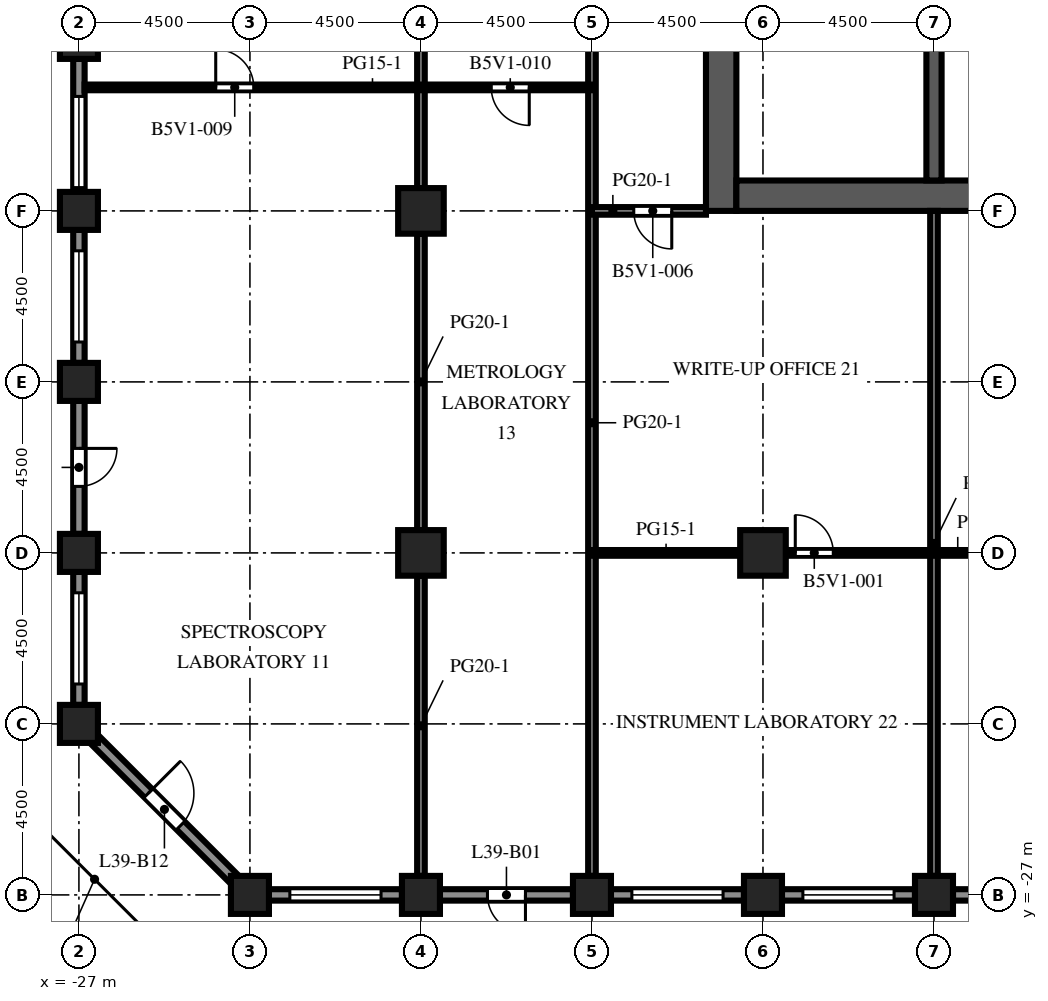
"""IFC4 building model, lengths in metres.
Left out: names, types, materials, properties, quantities, classifications, styles, units other than length and angle.
Written with IfcOpenShell. Run it as: python <this file> out.ifc"""

import sys

from ifc_helpers import new_model, si_unit, direction, frame, frame_2d, origin, origin_2d, place, context, subcontext, project, spatial, rectangle, extrude, element, fill, save


model = new_model("IFC4")
c1 = context("Model", 3, precision=1e-05, world=origin(), true_north=direction((0.0, 1.0)))
c2 = subcontext(c1, "Body", "Model", "MODEL_VIEW")
j1 = project(units=[si_unit("LENGTHUNIT", "METRE"), si_unit("PLANEANGLEUNIT", "RADIAN")], contexts=[c1])
p1 = place(None, origin())
s1 = spatial("IfcSite", under=j1, at=p1, CompositionType="ELEMENT")
p2 = place(p1, origin())
s2 = spatial("IfcBuilding", under=s1, at=p2, CompositionType="ELEMENT")
p3 = place(p2, frame((0.0, 0.0, 173.2)))
s3 = spatial("IfcBuildingStorey", under=s2, at=p3, CompositionType="ELEMENT", Elevation=173.2)
for number, where, z_axis, x_axis in (
    (1, (-27.0, -22.5, 0.0), (0.0, 0.0, 1.0), (1.0, 0.0, 0.0)),
    (2, (-27.0, -18.0, 0.0), (0.0, 0.0, 1.0), (1.0, 0.0, 0.0)),
    (3, (-27.0, -13.5, 0.0), (0.0, 0.0, 1.0), (1.0, 0.0, 0.0)),
    (4, (-27.0, -9.0, 0.0), (0.0, 0.0, 1.0), (1.0, 0.0, 0.0)),
    (5, (-27.0, -4.5, 0.0), (0.0, 0.0, 1.0), (1.0, 0.0, 0.0)),
    (6, (-22.5, -27.0, 0.0), (0.0, 0.0, 1.0), (1.0, 0.0, 0.0)),
    (7, (-18.0, -27.0, 0.0), (0.0, 0.0, 1.0), (1.0, 0.0, 0.0)),
    (8, (-13.5, -27.0, 0.0), (0.0, 0.0, 1.0), (1.0, 0.0, 0.0)),
    (9, (-9.0, -27.0, 0.0), (0.0, 0.0, 1.0), (1.0, 0.0, 0.0)),
    (10, (-4.5, -27.0, 0.0), (0.0, 0.0, 1.0), (1.0, 0.0, 0.0)),
):
    element("IfcColumn", number, at=place(p3, frame(where, z_axis=z_axis, x_axis=x_axis)), inside=s3, PredefinedType="COLUMN", context=c2, shape_type="SweptSolid", body=[
        extrude(rectangle(XDim=1.0, YDim=1.0, at=origin_2d()), origin(), (0.0, 0.0, 1.0), 4.1),
    ])
for number, where, z_axis, x_axis in (
    (11, (-18.0, -18.0, 0.0), (0.0, 0.0, 1.0), (1.0, 0.0, 0.0)),
    (12, (-18.0, -9.0, 0.0), (0.0, 0.0, 1.0), (1.0, 0.0, 0.0)),
    (13, (-9.0, -18.0, 0.0), (0.0, 0.0, 1.0), (1.0, 0.0, 0.0)),
):
    element("IfcColumn", number, at=place(p3, frame(where, z_axis=z_axis, x_axis=x_axis)), inside=s3, PredefinedType="COLUMN", context=c2, shape_type="SweptSolid", body=[
        extrude(rectangle(XDim=1.2, YDim=1.2, at=origin_2d()), origin(), (0.0, 0.0, 1.0), 4.1),
    ])
p4 = place(p3, frame((-10.1, -9.0, 0.0), z_axis=(0.0, 0.0, 1.0), x_axis=(0.0, 1.0, 0.0)))
e14 = element("IfcWall", 14, at=p4, inside=s3, PredefinedType="SHEAR", context=c2, shape_type="SweptSolid", body=[
    extrude(rectangle(XDim=27.5, YDim=0.8, at=frame_2d((13.75, 0.0))), origin(), (0.0, 0.0, 1.0), 4.1),
])
p5 = place(p4, frame((12.55, 0.0, 0.0)))
e15 = element("IfcOpeningElement", 15, at=p5, cuts=e14, PredefinedType="OPENING", context=c2, shape_type="SweptSolid", body=[
    extrude(rectangle(XDim=2.4, YDim=2.4, at=frame_2d((1.2, 1.2))), frame((0.0, 0.41, 0.0), z_axis=(0.0, -1.0, 0.0), x_axis=(1.0, 0.0, 0.0)), (0.0, 0.0, 1.0), 0.82),
])
p6 = place(p4, frame((6.825, 0.0, 0.0)))
e16 = element("IfcOpeningElement", 16, at=p6, cuts=e14, PredefinedType="OPENING", context=c2, shape_type="SweptSolid", body=[
    extrude(rectangle(XDim=1.2, YDim=2.1, at=frame_2d((0.6, 1.05))), frame((0.0, 0.41, 0.0), z_axis=(0.0, -1.0, 0.0), x_axis=(1.0, 0.0, 0.0)), (0.0, 0.0, 1.0), 0.82),
])
p7 = place(p4, frame((19.475, 0.0, 0.0)))
e17 = element("IfcOpeningElement", 17, at=p7, cuts=e14, PredefinedType="OPENING", context=c2, shape_type="SweptSolid", body=[
    extrude(rectangle(XDim=1.2, YDim=2.1, at=frame_2d((0.6, 1.05))), frame((0.0, 0.41, 0.0), z_axis=(0.0, -1.0, 0.0), x_axis=(1.0, 0.0, 0.0)), (0.0, 0.0, 1.0), 0.82),
])
p8 = place(p3, frame((-9.7, -8.6, 0.0), z_axis=(0.0, 0.0, 1.0), x_axis=(1.0, 0.0, 0.0)))
e18 = element("IfcWall", 18, at=p8, inside=s3, PredefinedType="SHEAR", context=c2, shape_type="SweptSolid", body=[
    extrude(rectangle(XDim=10.4, YDim=0.8, at=frame_2d((5.2, 0.0))), origin(), (0.0, 0.0, 1.0), 4.1),
])
p9 = place(p3, frame((-4.5, -8.2, 0.0), z_axis=(0.0, 0.0, 1.0), x_axis=(0.0, 1.0, 0.0)))
e19 = element("IfcWall", 19, at=p9, inside=s3, PredefinedType="SHEAR", context=c2, shape_type="SweptSolid", body=[
    extrude(rectangle(XDim=7.5, YDim=0.4, at=frame_2d((3.75, 0.0))), origin(), (0.0, 0.0, 1.0), 4.1),
])
p10 = place(p3, frame((-18.5, -27.0, 0.0), z_axis=(0.0, 0.0, 1.0), x_axis=(-1.0, 0.0, 0.0)))
e20 = element("IfcWall", 20, at=p10, inside=s3, PredefinedType="SOLIDWALL", context=c2, shape_type="SweptSolid", body=[
    extrude(rectangle(XDim=3.5, YDim=0.3, at=frame_2d((1.75, 0.0))), origin(), (0.0, 0.0, 1.0), 2.85),
])
p11 = place(p10, frame((0.55, 0.0, 0.8)))
e21 = element("IfcOpeningElement", 21, at=p11, cuts=e20, PredefinedType="OPENING", context=c2, shape_type="SweptSolid", body=[
    extrude(rectangle(XDim=2.4, YDim=1.7, at=frame_2d((1.2, 0.85))), frame((0.0, 0.16, 0.0), z_axis=(0.0, -1.0, 0.0), x_axis=(1.0, 0.0, 0.0)), (0.0, 0.0, 1.0), 0.32),
])
p12 = place(p3, frame((-14.0, -27.0, 0.0), z_axis=(0.0, 0.0, 1.0), x_axis=(-1.0, 0.0, 0.0)))
e22 = element("IfcWall", 22, at=p12, inside=s3, PredefinedType="SOLIDWALL", context=c2, shape_type="SweptSolid", body=[
    extrude(rectangle(XDim=3.5, YDim=0.3, at=frame_2d((1.75, 0.0))), origin(), (0.0, 0.0, 1.0), 2.85),
])
p13 = place(p12, frame((1.25, 0.0, 0.0)))
e23 = element("IfcOpeningElement", 23, at=p13, cuts=e22, PredefinedType="OPENING", context=c2, shape_type="SweptSolid", body=[
    extrude(rectangle(XDim=1.0, YDim=2.2, at=frame_2d((0.5, 1.1))), frame((0.0, 0.16, 0.0), z_axis=(0.0, -1.0, 0.0), x_axis=(1.0, 0.0, 0.0)), (0.0, 0.0, 1.0), 0.32),
])
p14 = place(p3, frame((-9.5, -27.0, 0.0), z_axis=(0.0, 0.0, 1.0), x_axis=(-1.0, 0.0, 0.0)))
e24 = element("IfcWall", 24, at=p14, inside=s3, PredefinedType="SOLIDWALL", context=c2, shape_type="SweptSolid", body=[
    extrude(rectangle(XDim=3.5, YDim=0.3, at=frame_2d((1.75, 0.0))), origin(), (0.0, 0.0, 1.0), 2.85),
])
p15 = place(p14, frame((0.55, 0.0, 0.8)))
e25 = element("IfcOpeningElement", 25, at=p15, cuts=e24, PredefinedType="OPENING", context=c2, shape_type="SweptSolid", body=[
    extrude(rectangle(XDim=2.4, YDim=1.7, at=frame_2d((1.2, 0.85))), frame((0.0, 0.16, 0.0), z_axis=(0.0, -1.0, 0.0), x_axis=(1.0, 0.0, 0.0)), (0.0, 0.0, 1.0), 0.32),
])
p16 = place(p3, frame((-5.0, -27.0, 0.0), z_axis=(0.0, 0.0, 1.0), x_axis=(-1.0, 0.0, 0.0)))
e26 = element("IfcWall", 26, at=p16, inside=s3, PredefinedType="SOLIDWALL", context=c2, shape_type="SweptSolid", body=[
    extrude(rectangle(XDim=3.5, YDim=0.3, at=frame_2d((1.75, 0.0))), origin(), (0.0, 0.0, 1.0), 2.85),
])
p17 = place(p16, frame((0.55, 0.0, 0.8)))
e27 = element("IfcOpeningElement", 27, at=p17, cuts=e26, PredefinedType="OPENING", context=c2, shape_type="SweptSolid", body=[
    extrude(rectangle(XDim=2.4, YDim=1.7, at=frame_2d((1.2, 0.85))), frame((0.0, 0.16, 0.0), z_axis=(0.0, -1.0, 0.0), x_axis=(1.0, 0.0, 0.0)), (0.0, 0.0, 1.0), 0.32),
])
p18 = place(p3, frame((-0.5, -27.0, 0.0), z_axis=(0.0, 0.0, 1.0), x_axis=(-1.0, 0.0, 0.0)))
e28 = element("IfcWall", 28, at=p18, inside=s3, PredefinedType="SOLIDWALL", context=c2, shape_type="SweptSolid", body=[
    extrude(rectangle(XDim=3.5, YDim=0.3, at=frame_2d((1.75, 0.0))), origin(), (0.0, 0.0, 1.0), 2.85),
])
p19 = place(p18, frame((0.55, 0.0, 0.8)))
e29 = element("IfcOpeningElement", 29, at=p19, cuts=e28, PredefinedType="OPENING", context=c2, shape_type="SweptSolid", body=[
    extrude(rectangle(XDim=2.4, YDim=1.7, at=frame_2d((1.2, 0.85))), frame((0.0, 0.16, 0.0), z_axis=(0.0, -1.0, 0.0), x_axis=(1.0, 0.0, 0.0)), (0.0, 0.0, 1.0), 0.32),
])
p20 = place(p3, frame((-27.0, -8.5, 0.0), z_axis=(0.0, 0.0, 1.0), x_axis=(0.0, 1.0, 0.0)))
e30 = element("IfcWall", 30, at=p20, inside=s3, PredefinedType="SOLIDWALL", context=c2, shape_type="SweptSolid", body=[
    extrude(rectangle(XDim=3.5, YDim=0.3, at=frame_2d((1.75, 0.0))), origin(), (0.0, 0.0, 1.0), 2.85),
])
p21 = place(p20, frame((0.113, 0.0, 0.8)))
e31 = element("IfcOpeningElement", 31, at=p21, cuts=e30, PredefinedType="OPENING", context=c2, shape_type="SweptSolid", body=[
    extrude(rectangle(XDim=2.4, YDim=1.7, at=frame_2d((1.2, 0.85))), frame((0.0, 0.16, 0.0), z_axis=(0.0, -1.0, 0.0), x_axis=(1.0, 0.0, 0.0)), (0.0, 0.0, 1.0), 0.32),
])
p22 = place(p3, frame((-27.0, -13.0, 0.0), z_axis=(0.0, 0.0, 1.0), x_axis=(0.0, 1.0, 0.0)))
e32 = element("IfcWall", 32, at=p22, inside=s3, PredefinedType="SOLIDWALL", context=c2, shape_type="SweptSolid", body=[
    extrude(rectangle(XDim=3.5, YDim=0.3, at=frame_2d((1.75, 0.0))), origin(), (0.0, 0.0, 1.0), 2.85),
])
p23 = place(p22, frame((0.55, 0.0, 0.8)))
e33 = element("IfcOpeningElement", 33, at=p23, cuts=e32, PredefinedType="OPENING", context=c2, shape_type="SweptSolid", body=[
    extrude(rectangle(XDim=2.4, YDim=1.7, at=frame_2d((1.2, 0.85))), frame((0.0, 0.16, 0.0), z_axis=(0.0, -1.0, 0.0), x_axis=(1.0, 0.0, 0.0)), (0.0, 0.0, 1.0), 0.32),
])
p24 = place(p3, frame((-27.0, -17.5, 0.0), z_axis=(0.0, 0.0, 1.0), x_axis=(0.0, 1.0, 0.0)))
e34 = element("IfcWall", 34, at=p24, inside=s3, PredefinedType="SOLIDWALL", context=c2, shape_type="SweptSolid", body=[
    extrude(rectangle(XDim=3.5, YDim=0.3, at=frame_2d((1.75, 0.0))), origin(), (0.0, 0.0, 1.0), 2.85),
])
p25 = place(p24, frame((1.25, 0.0, 0.0)))
e35 = element("IfcOpeningElement", 35, at=p25, cuts=e34, PredefinedType="OPENING", context=c2, shape_type="SweptSolid", body=[
    extrude(rectangle(XDim=1.0, YDim=2.2, at=frame_2d((0.5, 1.1))), frame((0.0, 0.16, 0.0), z_axis=(0.0, -1.0, 0.0), x_axis=(1.0, 0.0, 0.0)), (0.0, 0.0, 1.0), 0.32),
])
p26 = place(p3, frame((-27.0, -22.0, 0.0), z_axis=(0.0, 0.0, 1.0), x_axis=(0.0, 1.0, 0.0)))
e36 = element("IfcWall", 36, at=p26, inside=s3, PredefinedType="SOLIDWALL", context=c2, shape_type="SweptSolid", body=[
    extrude(rectangle(XDim=3.5, YDim=0.3, at=frame_2d((1.75, 0.0))), origin(), (0.0, 0.0, 1.0), 2.85),
])
p27 = place(p26, frame((0.55, 0.0, 0.8)))
e37 = element("IfcOpeningElement", 37, at=p27, cuts=e36, PredefinedType="OPENING", context=c2, shape_type="SweptSolid", body=[
    extrude(rectangle(XDim=2.4, YDim=1.7, at=frame_2d((1.2, 0.85))), frame((0.0, 0.16, 0.0), z_axis=(0.0, -1.0, 0.0), x_axis=(1.0, 0.0, 0.0)), (0.0, 0.0, 1.0), 0.32),
])
p28 = place(p3, frame((-22.894, -26.606, 0.0), z_axis=(0.0, 0.0, 1.0), x_axis=(-0.707106781187, 0.707106781187, 0.0)))
e38 = element("IfcWall", 38, at=p28, inside=s3, PredefinedType="SOLIDWALL", context=c2, shape_type="SweptSolid", body=[
    extrude(rectangle(XDim=5.25, YDim=0.3, at=frame_2d((2.625, 0.0))), origin(), (0.0, 0.0, 1.0), 2.85),
])
p29 = place(p28, frame((2.025, 0.0, 0.0)))
e39 = element("IfcOpeningElement", 39, at=p29, cuts=e38, PredefinedType="OPENING", context=c2, shape_type="SweptSolid", body=[
    extrude(rectangle(XDim=1.2, YDim=2.2, at=frame_2d((0.6, 1.1))), frame((0.0, 0.16, 0.0), z_axis=(0.0, -1.0, 0.0), x_axis=(1.0, 0.0, 0.0)), (0.0, 0.0, 1.0), 0.32),
])
p30 = place(p3, frame((-4.3, -5.65, 0.0), z_axis=(0.0, 0.0, 1.0), x_axis=(1.0, 0.0, 0.0)))
e40 = element("IfcWall", 40, at=p30, inside=s3, PredefinedType="PARTITIONING", context=c2, shape_type="SweptSolid", body=[
    extrude(rectangle(XDim=3.5, YDim=0.1, at=frame_2d((1.75, 0.0))), origin(), (0.0, 0.0, 1.0), 3.65),
])
p31 = place(p3, frame((-18.0, -26.5, 0.0), z_axis=(0.0, 0.0, 1.0), x_axis=(0.0, 1.0, 0.0)))
e41 = element("IfcWall", 41, at=p31, inside=s3, PredefinedType="PARTITIONING", context=c2, shape_type="SweptSolid", body=[
    extrude(rectangle(XDim=7.9, YDim=0.2, at=frame_2d((3.95, 0.0))), origin(), (0.0, 0.0, 1.0), 3.65),
])
for number, where, z_axis, x_axis in (
    (42, (-18.0, -17.4, 0.0), (0.0, 0.0, 1.0), (0.0, 1.0, 0.0)),
    (43, (-18.0, -8.4, 0.0), (0.0, 0.0, 1.0), (0.0, 1.0, 0.0)),
):
    element("IfcWall", number, at=place(p3, frame(where, z_axis=z_axis, x_axis=x_axis)), inside=s3, PredefinedType="PARTITIONING", context=c2, shape_type="SweptSolid", body=[
        extrude(rectangle(XDim=7.8, YDim=0.2, at=frame_2d((3.9, 0.0))), origin(), (0.0, 0.0, 1.0), 3.65),
    ])
p32 = place(p3, frame((-13.5, -26.5, 0.0), z_axis=(0.0, 0.0, 1.0), x_axis=(0.0, 1.0, 0.0)))
e44 = element("IfcWall", 44, at=p32, inside=s3, PredefinedType="PARTITIONING", context=c2, shape_type="SweptSolid", body=[
    extrude(rectangle(XDim=29.75, YDim=0.2, at=frame_2d((14.875, 0.0))), origin(), (0.0, 0.0, 1.0), 3.65),
])
p33 = place(p32, frame((23.85, 0.0, 0.0)))
e45 = element("IfcOpeningElement", 45, at=p33, cuts=e44, PredefinedType="OPENING", context=c2, shape_type="SweptSolid", body=[
    extrude(rectangle(XDim=1.0, YDim=2.1, at=frame_2d((0.5, 1.05))), frame((0.0, 0.11, 0.0), z_axis=(0.0, -1.0, 0.0), x_axis=(1.0, 0.0, 0.0)), (0.0, 0.0, 1.0), 0.22),
])
p34 = place(p3, frame((-4.5, -26.5, 0.0), z_axis=(0.0, 0.0, 1.0), x_axis=(0.0, 1.0, 0.0)))
e46 = element("IfcWall", 46, at=p34, inside=s3, PredefinedType="PARTITIONING", context=c2, shape_type="SweptSolid", body=[
    extrude(rectangle(XDim=17.5, YDim=0.2, at=frame_2d((8.75, 0.0))), origin(), (0.0, 0.0, 1.0), 3.65),
])
p35 = place(p3, frame((-13.5, -18.0, 0.0), z_axis=(0.0, 0.0, 1.0), x_axis=(1.0, 0.0, 0.0)))
e47 = element("IfcWall", 47, at=p35, inside=s3, PredefinedType="PARTITIONING", context=c2, shape_type="SweptSolid", body=[
    extrude(rectangle(XDim=3.9, YDim=0.15, at=frame_2d((1.95, 0.0))), origin(), (0.0, 0.0, 1.0), 3.65),
])
p36 = place(p3, frame((-0.6, -18.0, 0.0), z_axis=(0.0, 0.0, 1.0), x_axis=(-1.0, 0.0, 0.0)))
e48 = element("IfcWall", 48, at=p36, inside=s3, PredefinedType="PARTITIONING", context=c2, shape_type="SweptSolid", body=[
    extrude(rectangle(XDim=7.8, YDim=0.15, at=frame_2d((3.9, 0.0))), origin(), (0.0, 0.0, 1.0), 3.65),
])
p37 = place(p36, frame((6.55, 0.0, 0.0)))
e49 = element("IfcOpeningElement", 49, at=p37, cuts=e48, PredefinedType="OPENING", context=c2, shape_type="SweptSolid", body=[
    extrude(rectangle(XDim=1.0, YDim=2.1, at=frame_2d((0.5, 1.05))), frame((0.0, 0.085, 0.0), z_axis=(0.0, -1.0, 0.0), x_axis=(1.0, 0.0, 0.0)), (0.0, 0.0, 1.0), 0.17),
])
p38 = place(p3, frame((-10.5, -9.0, 0.0), z_axis=(0.0, 0.0, 1.0), x_axis=(-1.0, 0.0, 0.0)))
e50 = element("IfcWall", 50, at=p38, inside=s3, PredefinedType="PARTITIONING", context=c2, shape_type="SweptSolid", body=[
    extrude(rectangle(XDim=3.0, YDim=0.2, at=frame_2d((1.5, 0.0))), origin(), (0.0, 0.0, 1.0), 3.65),
])
p39 = place(p38, frame((0.9, 0.0, 0.0)))
e51 = element("IfcOpeningElement", 51, at=p39, cuts=e50, PredefinedType="OPENING", context=c2, shape_type="SweptSolid", body=[
    extrude(rectangle(XDim=1.0, YDim=2.1, at=frame_2d((0.5, 1.05))), frame((0.0, 0.11, 0.0), z_axis=(0.0, -1.0, 0.0), x_axis=(1.0, 0.0, 0.0)), (0.0, 0.0, 1.0), 0.22),
])
p40 = place(p3, frame((-13.5, -5.75, 0.0), z_axis=(0.0, 0.0, 1.0), x_axis=(-1.0, 0.0, 0.0)))
e52 = element("IfcWall", 52, at=p40, inside=s3, PredefinedType="PARTITIONING", context=c2, shape_type="SweptSolid", body=[
    extrude(rectangle(XDim=13.35, YDim=0.15, at=frame_2d((6.675, 0.0))), origin(), (0.0, 0.0, 1.0), 3.65),
])
p41 = place(p40, frame((8.9, 0.0, 0.0)))
e53 = element("IfcOpeningElement", 53, at=p41, cuts=e52, PredefinedType="OPENING", context=c2, shape_type="SweptSolid", body=[
    extrude(rectangle(XDim=1.0, YDim=2.1, at=frame_2d((0.5, 1.05))), frame((0.0, 0.085, 0.0), z_axis=(0.0, -1.0, 0.0), x_axis=(1.0, 0.0, 0.0)), (0.0, 0.0, 1.0), 0.17),
])
p42 = place(p40, frame((1.65, 0.0, 0.0)))
e54 = element("IfcOpeningElement", 54, at=p42, cuts=e52, PredefinedType="OPENING", context=c2, shape_type="SweptSolid", body=[
    extrude(rectangle(XDim=1.0, YDim=2.1, at=frame_2d((0.5, 1.05))), frame((0.0, 0.085, 0.0), z_axis=(0.0, -1.0, 0.0), x_axis=(1.0, 0.0, 0.0)), (0.0, 0.0, 1.0), 0.17),
])
p43 = place(p11, origin())
e55 = element("IfcWindow", 55, at=p43, inside=s3, PartitioningType="SINGLE_PANEL", PredefinedType="WINDOW", context=c2, shape_type="SweptSolid", body=[
    extrude(rectangle(XDim=2.4, YDim=1.7, at=frame_2d((1.2, 0.85))), frame((0.0, 0.03, 0.0), z_axis=(0.0, -1.0, 0.0), x_axis=(1.0, 0.0, 0.0)), (0.0, 0.0, 1.0), 0.06),
])
fill(e21, e55)
p44 = place(p13, origin())
e56 = element("IfcDoor", 56, at=p44, inside=s3, OperationType="SINGLE_SWING_LEFT", PredefinedType="DOOR", context=c2, shape_type="SweptSolid", body=[
    extrude(rectangle(XDim=1.0, YDim=2.2, at=frame_2d((0.5, 1.1))), frame((0.0, 0.025, 0.0), z_axis=(0.0, -1.0, 0.0), x_axis=(1.0, 0.0, 0.0)), (0.0, 0.0, 1.0), 0.05),
])
fill(e23, e56)
p45 = place(p15, origin())
e57 = element("IfcWindow", 57, at=p45, inside=s3, PartitioningType="SINGLE_PANEL", PredefinedType="WINDOW", context=c2, shape_type="SweptSolid", body=[
    extrude(rectangle(XDim=2.4, YDim=1.7, at=frame_2d((1.2, 0.85))), frame((0.0, 0.03, 0.0), z_axis=(0.0, -1.0, 0.0), x_axis=(1.0, 0.0, 0.0)), (0.0, 0.0, 1.0), 0.06),
])
fill(e25, e57)
p46 = place(p17, origin())
e58 = element("IfcWindow", 58, at=p46, inside=s3, PartitioningType="SINGLE_PANEL", PredefinedType="WINDOW", context=c2, shape_type="SweptSolid", body=[
    extrude(rectangle(XDim=2.4, YDim=1.7, at=frame_2d((1.2, 0.85))), frame((0.0, 0.03, 0.0), z_axis=(0.0, -1.0, 0.0), x_axis=(1.0, 0.0, 0.0)), (0.0, 0.0, 1.0), 0.06),
])
fill(e27, e58)
p47 = place(p21, origin())
e59 = element("IfcWindow", 59, at=p47, inside=s3, PartitioningType="SINGLE_PANEL", PredefinedType="WINDOW", context=c2, shape_type="SweptSolid", body=[
    extrude(rectangle(XDim=2.4, YDim=1.7, at=frame_2d((1.2, 0.85))), frame((0.0, 0.03, 0.0), z_axis=(0.0, -1.0, 0.0), x_axis=(1.0, 0.0, 0.0)), (0.0, 0.0, 1.0), 0.06),
])
fill(e31, e59)
p48 = place(p23, origin())
e60 = element("IfcWindow", 60, at=p48, inside=s3, PartitioningType="SINGLE_PANEL", PredefinedType="WINDOW", context=c2, shape_type="SweptSolid", body=[
    extrude(rectangle(XDim=2.4, YDim=1.7, at=frame_2d((1.2, 0.85))), frame((0.0, 0.03, 0.0), z_axis=(0.0, -1.0, 0.0), x_axis=(1.0, 0.0, 0.0)), (0.0, 0.0, 1.0), 0.06),
])
fill(e33, e60)
p49 = place(p25, origin())
e61 = element("IfcDoor", 61, at=p49, inside=s3, OperationType="SINGLE_SWING_RIGHT", PredefinedType="DOOR", context=c2, shape_type="SweptSolid", body=[
    extrude(rectangle(XDim=1.0, YDim=2.2, at=frame_2d((0.5, 1.1))), frame((0.0, 0.025, 0.0), z_axis=(0.0, -1.0, 0.0), x_axis=(1.0, 0.0, 0.0)), (0.0, 0.0, 1.0), 0.05),
])
fill(e35, e61)
p50 = place(p27, origin())
e62 = element("IfcWindow", 62, at=p50, inside=s3, PartitioningType="SINGLE_PANEL", PredefinedType="WINDOW", context=c2, shape_type="SweptSolid", body=[
    extrude(rectangle(XDim=2.4, YDim=1.7, at=frame_2d((1.2, 0.85))), frame((0.0, 0.03, 0.0), z_axis=(0.0, -1.0, 0.0), x_axis=(1.0, 0.0, 0.0)), (0.0, 0.0, 1.0), 0.06),
])
fill(e37, e62)
p51 = place(p29, origin())
e63 = element("IfcDoor", 63, at=p51, inside=s3, OperationType="SINGLE_SWING_RIGHT", PredefinedType="DOOR", context=c2, shape_type="SweptSolid", body=[
    extrude(rectangle(XDim=1.2, YDim=2.2, at=frame_2d((0.6, 1.1))), frame((0.0, 0.025, 0.0), z_axis=(0.0, -1.0, 0.0), x_axis=(1.0, 0.0, 0.0)), (0.0, 0.0, 1.0), 0.05),
])
fill(e39, e63)
p52 = place(p37, origin())
e64 = element("IfcDoor", 64, at=p52, inside=s3, OperationType="SINGLE_SWING_RIGHT", PredefinedType="DOOR", context=c2, shape_type="SweptSolid", body=[
    extrude(rectangle(XDim=1.0, YDim=2.1, at=frame_2d((0.5, 1.05))), frame((0.0, 0.025, 0.0), z_axis=(0.0, -1.0, 0.0), x_axis=(1.0, 0.0, 0.0)), (0.0, 0.0, 1.0), 0.05),
])
fill(e49, e64)
p53 = place(p39, origin())
e65 = element("IfcDoor", 65, at=p53, inside=s3, OperationType="SINGLE_SWING_LEFT", PredefinedType="DOOR", context=c2, shape_type="SweptSolid", body=[
    extrude(rectangle(XDim=1.0, YDim=2.1, at=frame_2d((0.5, 1.05))), frame((0.0, 0.025, 0.0), z_axis=(0.0, -1.0, 0.0), x_axis=(1.0, 0.0, 0.0)), (0.0, 0.0, 1.0), 0.05),
])
fill(e51, e65)
p54 = place(p41, origin())
e66 = element("IfcDoor", 66, at=p54, inside=s3, OperationType="SINGLE_SWING_RIGHT", PredefinedType="DOOR", context=c2, shape_type="SweptSolid", body=[
    extrude(rectangle(XDim=1.0, YDim=2.1, at=frame_2d((0.5, 1.05))), frame((0.0, 0.025, 0.0), z_axis=(0.0, -1.0, 0.0), x_axis=(1.0, 0.0, 0.0)), (0.0, 0.0, 1.0), 0.05),
])
fill(e53, e66)
p55 = place(p42, origin())
e67 = element("IfcDoor", 67, at=p55, inside=s3, OperationType="SINGLE_SWING_LEFT", PredefinedType="DOOR", context=c2, shape_type="SweptSolid", body=[
    extrude(rectangle(XDim=1.0, YDim=2.1, at=frame_2d((0.5, 1.05))), frame((0.0, 0.025, 0.0), z_axis=(0.0, -1.0, 0.0), x_axis=(1.0, 0.0, 0.0)), (0.0, 0.0, 1.0), 0.05),
])
fill(e54, e67)
save(model, sys.argv[1])
